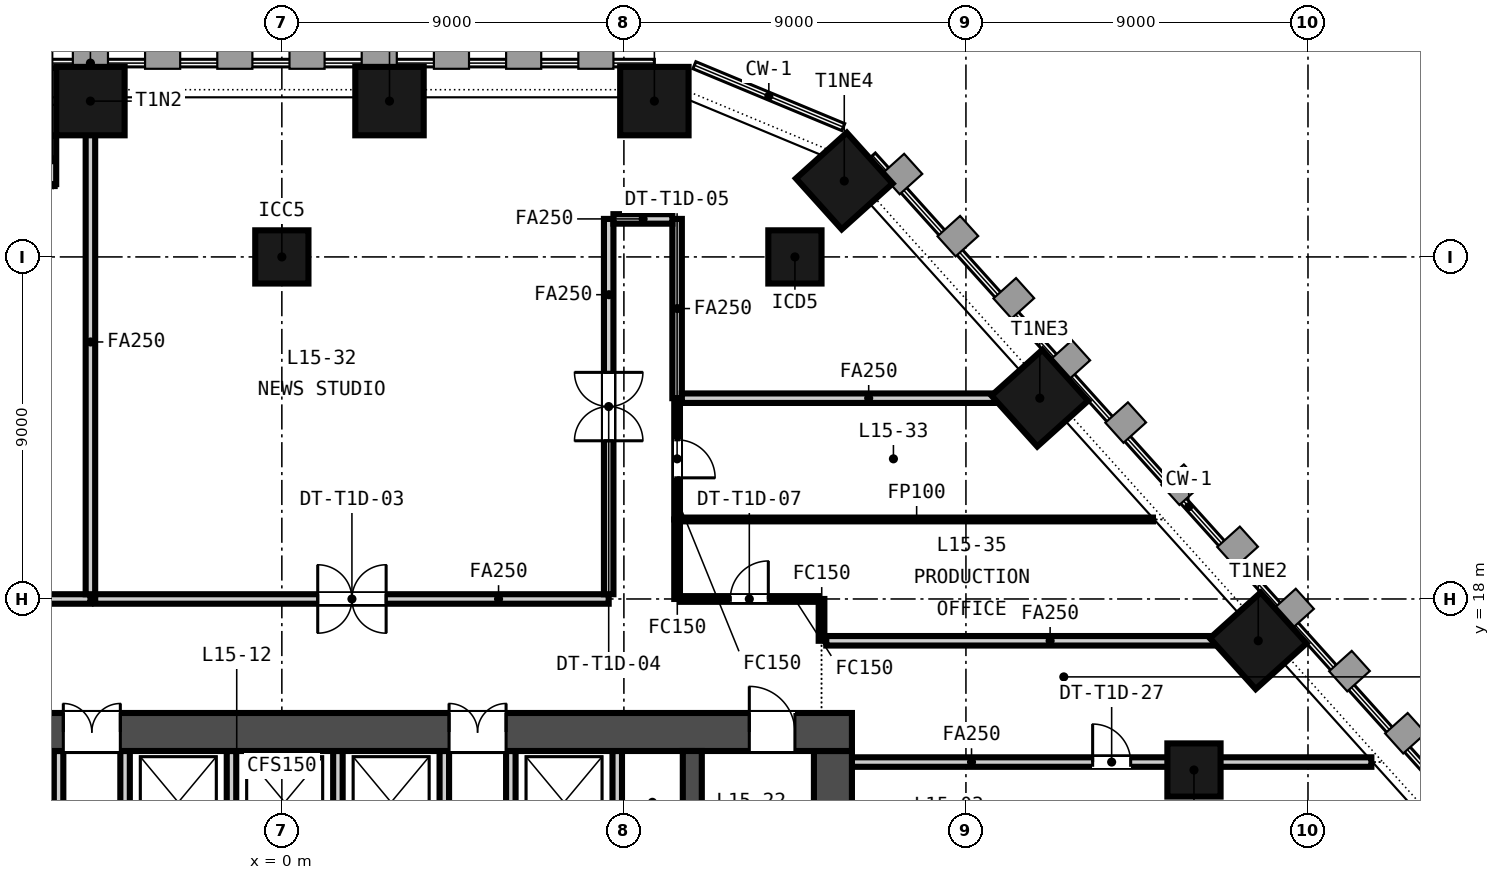
"""IFC4 building model, lengths in metres.
Left out: names, types, materials, properties, quantities, classifications, styles, units other than length and angle.
Written with IfcOpenShell. Run it as: python <this file> out.ifc"""

import sys

from ifc_helpers import new_model, si_unit, direction, frame, frame_2d, origin, origin_2d, place, context, subcontext, project, spatial, rectangle, extrude, element, fill, save


model = new_model("IFC4")
c1 = context("Model", 3, precision=1e-05, world=origin(), true_north=direction((0.0, 1.0)))
c2 = subcontext(c1, "Body", "Model", "MODEL_VIEW")
j1 = project(units=[si_unit("LENGTHUNIT", "METRE"), si_unit("PLANEANGLEUNIT", "RADIAN")], contexts=[c1])
p1 = place(None, origin())
s1 = spatial("IfcSite", under=j1, at=p1, CompositionType="ELEMENT")
p2 = place(p1, origin())
s2 = spatial("IfcBuilding", under=s1, at=p2, CompositionType="ELEMENT")
p3 = place(p2, frame((0.0, 0.0, 68.85)))
s3 = spatial("IfcBuildingStorey", under=s2, at=p3, CompositionType="ELEMENT", Elevation=68.85)
p4 = place(p3, frame((-15.0, 14.5, -0.15), z_axis=(0.0, 0.0, 1.0), x_axis=(1.0, 0.0, 0.0)))
e1 = element("IfcWall", 1, at=p4, inside=s3, PredefinedType="SOLIDWALL", context=c2, shape_type="SweptSolid", body=[
    extrude(rectangle(XDim=30.0, YDim=1.0, at=frame_2d((15.0, 0.0))), origin(), (0.0, 0.0, 1.0), 3.65),
])
p5 = place(p4, frame((9.25, 0.0, 0.15)))
e2 = element("IfcOpeningElement", 2, at=p5, cuts=e1, PredefinedType="OPENING", context=c2, shape_type="SweptSolid", body=[
    extrude(rectangle(XDim=1.5, YDim=2.1, at=frame_2d((0.75, 1.05))), frame((0.0, 0.51, 0.0), z_axis=(0.0, -1.0, 0.0), x_axis=(1.0, 0.0, 0.0)), (0.0, 0.0, 1.0), 1.02),
])
p6 = place(p4, frame((19.4, 0.0, 0.15)))
e3 = element("IfcOpeningElement", 3, at=p6, cuts=e1, PredefinedType="OPENING", context=c2, shape_type="SweptSolid", body=[
    extrude(rectangle(XDim=1.5, YDim=2.1, at=frame_2d((0.75, 1.05))), frame((0.0, 0.51, 0.0), z_axis=(0.0, -1.0, 0.0), x_axis=(1.0, 0.0, 0.0)), (0.0, 0.0, 1.0), 1.02),
])
p7 = place(p4, frame((1.5, 0.0, 0.15)))
e4 = element("IfcOpeningElement", 4, at=p7, cuts=e1, PredefinedType="OPENING", context=c2, shape_type="SweptSolid", body=[
    extrude(rectangle(XDim=1.2, YDim=2.1, at=frame_2d((0.6, 1.05))), frame((0.0, 0.51, 0.0), z_axis=(0.0, -1.0, 0.0), x_axis=(1.0, 0.0, 0.0)), (0.0, 0.0, 1.0), 1.02),
])
p8 = place(p4, frame((27.3, 0.0, 0.15)))
e5 = element("IfcOpeningElement", 5, at=p8, cuts=e1, PredefinedType="OPENING", context=c2, shape_type="SweptSolid", body=[
    extrude(rectangle(XDim=1.2, YDim=2.1, at=frame_2d((0.6, 1.05))), frame((0.0, 0.51, 0.0), z_axis=(0.0, -1.0, 0.0), x_axis=(1.0, 0.0, 0.0)), (0.0, 0.0, 1.0), 1.02),
])
p9 = place(p3, frame((14.5, 1.0, -0.15), z_axis=(0.0, 0.0, 1.0), x_axis=(0.0, 1.0, 0.0)))
e6 = element("IfcWall", 6, at=p9, inside=s3, PredefinedType="SOLIDWALL", context=c2, shape_type="SweptSolid", body=[
    extrude(rectangle(XDim=13.0, YDim=1.0, at=frame_2d((6.5, 0.0))), origin(), (0.0, 0.0, 1.0), 3.65),
])
p10 = place(p3, frame((10.8, 1.0, -0.15), z_axis=(0.0, 0.0, 1.0), x_axis=(0.0, 1.0, 0.0)))
e7 = element("IfcWall", 7, at=p10, inside=s3, PredefinedType="SOLIDWALL", context=c2, shape_type="SweptSolid", body=[
    extrude(rectangle(XDim=13.0, YDim=0.5, at=frame_2d((6.5, 0.0))), origin(), (0.0, 0.0, 1.0), 3.65),
])
for number, where, z_axis, x_axis in (
    (8, (9.802, 31.1, -0.15), (0.0, 0.0, 1.0), (-1.0, 0.0, 0.0)),
    (9, (2.832, 31.1, -0.15), (0.0, 0.0, 1.0), (-1.0, 0.0, 0.0)),
    (10, (-5.037, 31.1, -0.15), (0.0, 0.0, 1.0), (-1.0, 0.0, 0.0)),
    (11, (25.691, 16.9, -0.15), (0.0, 0.0, 1.0), (-0.669, 0.743, 0.0)),
    (12, (19.944, 23.283, -0.15), (0.0, 0.0, 1.0), (-0.669, 0.743, 0.0)),
    (13, (14.799, 28.998, -0.15), (0.0, 0.0, 1.0), (-0.669, 0.743, 0.0)),
):
    element("IfcColumn", number, at=place(p3, frame(where, z_axis=z_axis, x_axis=x_axis)), inside=s3, PredefinedType="COLUMN", context=c2, shape_type="SweptSolid", body=[
        extrude(rectangle(XDim=1.8, YDim=1.8, at=origin_2d()), origin(), (0.0, 0.0, 1.0), 3.65),
    ])
for number, where, z_axis, x_axis in (
    (14, (0.0, 27.0, -0.15), (0.0, 0.0, 1.0), (1.0, 0.0, 0.0)),
    (15, (13.5, 27.0, -0.15), (0.0, 0.0, 1.0), (1.0, 0.0, 0.0)),
    (16, (24.0, 13.5, -0.15), (0.0, 0.0, 1.0), (1.0, 0.0, 0.0)),
):
    element("IfcColumn", number, at=place(p3, frame(where, z_axis=z_axis, x_axis=x_axis)), inside=s3, PredefinedType="COLUMN", context=c2, shape_type="SweptSolid", body=[
        extrude(rectangle(XDim=1.4, YDim=1.4, at=origin_2d()), origin(), (0.0, 0.0, 1.0), 3.65),
    ])
p11 = place(p3, frame((-6.037, 30.2, 0.0), z_axis=(0.0, 0.0, 1.0), x_axis=(0.0, -1.0, 0.0)))
e17 = element("IfcWall", 17, at=p11, inside=s3, PredefinedType="SOLIDWALL", context=c2, shape_type="SweptSolid", body=[
    extrude(rectangle(XDim=1.284, YDim=0.2, at=frame_2d((0.642, 0.0))), origin(), (0.0, 0.0, 1.0), 3.05),
])
for number, where, z_axis, x_axis in (
    (18, (-5.875, 11.3, 0.0), (0.0, 0.0, 1.0), (0.0, 1.0, 0.0)),
    (19, (-4.125, 11.3, 0.0), (0.0, 0.0, 1.0), (0.0, 1.0, 0.0)),
    (20, (-1.325, 11.3, 0.0), (0.0, 0.0, 1.0), (0.0, 1.0, 0.0)),
    (21, (1.475, 11.3, 0.0), (0.0, 0.0, 1.0), (0.0, 1.0, 0.0)),
    (22, (4.275, 11.3, 0.0), (0.0, 0.0, 1.0), (0.0, 1.0, 0.0)),
    (23, (6.025, 11.3, 0.0), (0.0, 0.0, 1.0), (0.0, 1.0, 0.0)),
    (24, (8.825, 11.3, 0.0), (0.0, 0.0, 1.0), (0.0, 1.0, 0.0)),
):
    element("IfcWall", number, at=place(p3, frame(where, z_axis=z_axis, x_axis=x_axis)), inside=s3, PredefinedType="PARTITIONING", context=c2, shape_type="SweptSolid", body=[
        extrude(rectangle(XDim=2.7, YDim=0.25, at=frame_2d((1.35, 0.0))), origin(), (0.0, 0.0, 1.0), 3.5),
    ])
p12 = place(p3, frame((10.4, 28.0, 0.0), z_axis=(0.0, 0.0, 1.0), x_axis=(0.0, -1.0, 0.0)))
e25 = element("IfcWall", 25, at=p12, inside=s3, PredefinedType="PARTITIONING", context=c2, shape_type="SweptSolid", body=[
    extrude(rectangle(XDim=4.717, YDim=0.25, at=frame_2d((2.358, 0.0))), origin(), (0.0, 0.0, 1.0), 2.741),
])
p13 = place(p3, frame((10.4, 23.283, 0.0), z_axis=(0.0, 0.0, 1.0), x_axis=(0.0, -1.0, 0.0)))
e26 = element("IfcWall", 26, at=p13, inside=s3, PredefinedType="PARTITIONING", context=c2, shape_type="SweptSolid", body=[
    extrude(rectangle(XDim=3.191, YDim=0.15, at=frame_2d((1.595, 0.0))), origin(), (0.0, 0.0, 1.0), 2.741),
])
p14 = place(p13, frame((1.095, 0.0, 0.0)))
e27 = element("IfcOpeningElement", 27, at=p14, cuts=e26, PredefinedType="OPENING", context=c2, shape_type="SweptSolid", body=[
    extrude(rectangle(XDim=1.0, YDim=2.1, at=frame_2d((0.5, 1.05))), frame((0.0, 0.085, 0.0), z_axis=(0.0, -1.0, 0.0), x_axis=(1.0, 0.0, 0.0)), (0.0, 0.0, 1.0), 0.17),
])
p15 = place(p3, frame((10.4, 20.092, 0.0), z_axis=(0.0, 0.0, 1.0), x_axis=(0.0, -1.0, 0.0)))
e28 = element("IfcWall", 28, at=p15, inside=s3, PredefinedType="PARTITIONING", context=c2, shape_type="SweptSolid", body=[
    extrude(rectangle(XDim=2.092, YDim=0.15, at=frame_2d((1.046, 0.0))), origin(), (0.0, 0.0, 1.0), 2.741),
])
p16 = place(p3, frame((14.2, 18.0, 0.0), z_axis=(0.0, 0.0, 1.0), x_axis=(0.0, -1.0, 0.0)))
e29 = element("IfcWall", 29, at=p16, inside=s3, PredefinedType="PARTITIONING", context=c2, shape_type="SweptSolid", body=[
    extrude(rectangle(XDim=1.1, YDim=0.15, at=frame_2d((0.55, 0.0))), origin(), (0.0, 0.0, 1.0), 2.741),
])
p17 = place(p3, frame((-12.782, 18.0, 0.0), z_axis=(0.0, 0.0, 1.0), x_axis=(1.0, 0.0, 0.0)))
e30 = element("IfcWall", 30, at=p17, inside=s3, PredefinedType="PARTITIONING", context=c2, shape_type="SweptSolid", body=[
    extrude(rectangle(XDim=7.745, YDim=0.25, at=frame_2d((3.873, 0.0))), origin(), (0.0, 0.0, 1.0), 2.741),
])
p18 = place(p17, frame((2.972, 0.0, 0.0)))
e31 = element("IfcOpeningElement", 31, at=p18, cuts=e30, PredefinedType="OPENING", context=c2, shape_type="SweptSolid", body=[
    extrude(rectangle(XDim=1.8, YDim=2.1, at=frame_2d((0.9, 1.05))), frame((0.0, 0.135, 0.0), z_axis=(0.0, -1.0, 0.0), x_axis=(1.0, 0.0, 0.0)), (0.0, 0.0, 1.0), 0.27),
])
p19 = place(p3, frame((-5.037, 18.125, 0.0), z_axis=(0.0, 0.0, 1.0), x_axis=(0.0, 1.0, 0.0)))
e32 = element("IfcWall", 32, at=p19, inside=s3, PredefinedType="PARTITIONING", context=c2, shape_type="SweptSolid", body=[
    extrude(rectangle(XDim=13.275, YDim=0.25, at=frame_2d((6.637, 0.0))), origin(), (0.0, 0.0, 1.0), 2.741),
])
p20 = place(p3, frame((-4.912, 18.0, 0.0), z_axis=(0.0, 0.0, 1.0), x_axis=(1.0, 0.0, 0.0)))
e33 = element("IfcWall", 33, at=p20, inside=s3, PredefinedType="PARTITIONING", context=c2, shape_type="SweptSolid", body=[
    extrude(rectangle(XDim=13.512, YDim=0.25, at=frame_2d((6.756, 0.0))), origin(), (0.0, 0.0, 1.0), 2.741),
])
p21 = place(p20, frame((5.856, 0.0, 0.0)))
e34 = element("IfcOpeningElement", 34, at=p21, cuts=e33, PredefinedType="OPENING", context=c2, shape_type="SweptSolid", body=[
    extrude(rectangle(XDim=1.8, YDim=2.1, at=frame_2d((0.9, 1.05))), frame((0.0, 0.135, 0.0), z_axis=(0.0, -1.0, 0.0), x_axis=(1.0, 0.0, 0.0)), (0.0, 0.0, 1.0), 0.27),
])
p22 = place(p3, frame((8.6, 18.125, 0.0), z_axis=(0.0, 0.0, 1.0), x_axis=(0.0, 1.0, 0.0)))
e35 = element("IfcWall", 35, at=p22, inside=s3, PredefinedType="PARTITIONING", context=c2, shape_type="SweptSolid", body=[
    extrude(rectangle(XDim=9.875, YDim=0.25, at=frame_2d((4.938, 0.0))), origin(), (0.0, 0.0, 1.0), 2.741),
])
p23 = place(p22, frame((4.038, 0.0, 0.0)))
e36 = element("IfcOpeningElement", 36, at=p23, cuts=e35, PredefinedType="OPENING", context=c2, shape_type="SweptSolid", body=[
    extrude(rectangle(XDim=1.8, YDim=2.1, at=frame_2d((0.9, 1.05))), frame((0.0, 0.135, 0.0), z_axis=(0.0, -1.0, 0.0), x_axis=(1.0, 0.0, 0.0)), (0.0, 0.0, 1.0), 0.27),
])
p24 = place(p3, frame((8.725, 28.0, 0.0), z_axis=(0.0, 0.0, 1.0), x_axis=(1.0, 0.0, 0.0)))
e37 = element("IfcWall", 37, at=p24, inside=s3, PredefinedType="PARTITIONING", context=c2, shape_type="SweptSolid", body=[
    extrude(rectangle(XDim=1.55, YDim=0.25, at=frame_2d((0.775, 0.0))), origin(), (0.0, 0.0, 1.0), 2.741),
])
p25 = place(p3, frame((10.525, 23.283, 0.0), z_axis=(0.0, 0.0, 1.0), x_axis=(1.0, 0.0, 0.0)))
e38 = element("IfcWall", 38, at=p25, inside=s3, PredefinedType="PARTITIONING", context=c2, shape_type="SweptSolid", body=[
    extrude(rectangle(XDim=9.822, YDim=0.25, at=frame_2d((4.911, 0.0))), origin(), (0.0, 0.0, 1.0), 2.741),
])
p26 = place(p3, frame((10.475, 20.092, 0.0), z_axis=(0.0, 0.0, 1.0), x_axis=(1.0, 0.0, 0.0)))
e39 = element("IfcWall", 39, at=p26, inside=s3, PredefinedType="PARTITIONING", context=c2, shape_type="SweptSolid", body=[
    extrude(rectangle(XDim=12.446, YDim=0.1, at=frame_2d((6.223, 0.0))), origin(), (0.0, 0.0, 1.0), 2.741),
])
p27 = place(p3, frame((10.475, 18.0, 0.0), z_axis=(0.0, 0.0, 1.0), x_axis=(1.0, 0.0, 0.0)))
e40 = element("IfcWall", 40, at=p27, inside=s3, PredefinedType="PARTITIONING", context=c2, shape_type="SweptSolid", body=[
    extrude(rectangle(XDim=3.65, YDim=0.15, at=frame_2d((1.825, 0.0))), origin(), (0.0, 0.0, 1.0), 2.741),
])
p28 = place(p27, frame((1.325, 0.0, 0.0)))
e41 = element("IfcOpeningElement", 41, at=p28, cuts=e40, PredefinedType="OPENING", context=c2, shape_type="SweptSolid", body=[
    extrude(rectangle(XDim=1.0, YDim=2.1, at=frame_2d((0.5, 1.05))), frame((0.0, 0.085, 0.0), z_axis=(0.0, -1.0, 0.0), x_axis=(1.0, 0.0, 0.0)), (0.0, 0.0, 1.0), 0.17),
])
p29 = place(p3, frame((14.325, 16.9, 0.0), z_axis=(0.0, 0.0, 1.0), x_axis=(1.0, 0.0, 0.0)))
e42 = element("IfcWall", 42, at=p29, inside=s3, PredefinedType="PARTITIONING", context=c2, shape_type="SweptSolid", body=[
    extrude(rectangle(XDim=11.77, YDim=0.25, at=frame_2d((5.885, 0.0))), origin(), (0.0, 0.0, 1.0), 2.741),
])
p30 = place(p3, frame((15.0, 13.709, 0.0), z_axis=(0.0, 0.0, 1.0), x_axis=(1.0, 0.0, 0.0)))
e43 = element("IfcWall", 43, at=p30, inside=s3, PredefinedType="PARTITIONING", context=c2, shape_type="SweptSolid", body=[
    extrude(rectangle(XDim=13.668, YDim=0.25, at=frame_2d((6.834, 0.0))), origin(), (0.0, 0.0, 1.0), 2.741),
])
p31 = place(p30, frame((6.334, 0.0, 0.0)))
e44 = element("IfcOpeningElement", 44, at=p31, cuts=e43, PredefinedType="OPENING", context=c2, shape_type="SweptSolid", body=[
    extrude(rectangle(XDim=1.0, YDim=2.1, at=frame_2d((0.5, 1.05))), frame((0.0, 0.135, 0.0), z_axis=(0.0, -1.0, 0.0), x_axis=(1.0, 0.0, 0.0)), (0.0, 0.0, 1.0), 0.27),
])
p32 = place(p5, origin())
e45 = element("IfcDoor", 45, at=p32, inside=s3, OperationType="DOUBLE_DOOR_SINGLE_SWING", PredefinedType="DOOR", context=c2, shape_type="SweptSolid", body=[
    extrude(rectangle(XDim=1.5, YDim=2.1, at=frame_2d((0.75, 1.05))), frame((0.0, 0.025, 0.0), z_axis=(0.0, -1.0, 0.0), x_axis=(1.0, 0.0, 0.0)), (0.0, 0.0, 1.0), 0.05),
])
fill(e2, e45)
p33 = place(p6, origin())
e46 = element("IfcDoor", 46, at=p33, inside=s3, OperationType="DOUBLE_DOOR_SINGLE_SWING", PredefinedType="DOOR", context=c2, shape_type="SweptSolid", body=[
    extrude(rectangle(XDim=1.5, YDim=2.1, at=frame_2d((0.75, 1.05))), frame((0.0, 0.025, 0.0), z_axis=(0.0, -1.0, 0.0), x_axis=(1.0, 0.0, 0.0)), (0.0, 0.0, 1.0), 0.05),
])
fill(e3, e46)
p34 = place(p8, origin())
e47 = element("IfcDoor", 47, at=p34, inside=s3, OperationType="SINGLE_SWING_LEFT", PredefinedType="DOOR", context=c2, shape_type="SweptSolid", body=[
    extrude(rectangle(XDim=1.2, YDim=2.1, at=frame_2d((0.6, 1.05))), frame((0.0, 0.025, 0.0), z_axis=(0.0, -1.0, 0.0), x_axis=(1.0, 0.0, 0.0)), (0.0, 0.0, 1.0), 0.05),
])
fill(e5, e47)
p35 = place(p21, origin())
e48 = element("IfcDoor", 48, at=p35, inside=s3, OperationType="DOUBLE_DOOR_DOUBLE_SWING", PredefinedType="DOOR", context=c2, shape_type="SweptSolid", body=[
    extrude(rectangle(XDim=1.8, YDim=2.1, at=frame_2d((0.9, 1.05))), frame((0.0, 0.025, 0.0), z_axis=(0.0, -1.0, 0.0), x_axis=(1.0, 0.0, 0.0)), (0.0, 0.0, 1.0), 0.05),
])
fill(e34, e48)
p36 = place(p23, origin())
e49 = element("IfcDoor", 49, at=p36, inside=s3, OperationType="DOUBLE_DOOR_DOUBLE_SWING", PredefinedType="DOOR", context=c2, shape_type="SweptSolid", body=[
    extrude(rectangle(XDim=1.8, YDim=2.1, at=frame_2d((0.9, 1.05))), frame((0.0, 0.025, 0.0), z_axis=(0.0, -1.0, 0.0), x_axis=(1.0, 0.0, 0.0)), (0.0, 0.0, 1.0), 0.05),
])
fill(e36, e49)
p37 = place(p14, origin())
e50 = element("IfcDoor", 50, at=p37, inside=s3, OperationType="SINGLE_SWING_RIGHT", PredefinedType="DOOR", context=c2, shape_type="SweptSolid", body=[
    extrude(rectangle(XDim=1.0, YDim=2.1, at=frame_2d((0.5, 1.05))), frame((0.0, 0.025, 0.0), z_axis=(0.0, -1.0, 0.0), x_axis=(1.0, 0.0, 0.0)), (0.0, 0.0, 1.0), 0.05),
])
fill(e27, e50)
p38 = place(p28, origin())
e51 = element("IfcDoor", 51, at=p38, inside=s3, OperationType="SINGLE_SWING_RIGHT", PredefinedType="DOOR", context=c2, shape_type="SweptSolid", body=[
    extrude(rectangle(XDim=1.0, YDim=2.1, at=frame_2d((0.5, 1.05))), frame((0.0, 0.025, 0.0), z_axis=(0.0, -1.0, 0.0), x_axis=(1.0, 0.0, 0.0)), (0.0, 0.0, 1.0), 0.05),
])
fill(e41, e51)
p39 = place(p31, origin())
e52 = element("IfcDoor", 52, at=p39, inside=s3, OperationType="SINGLE_SWING_LEFT", PredefinedType="DOOR", context=c2, shape_type="SweptSolid", body=[
    extrude(rectangle(XDim=1.0, YDim=2.1, at=frame_2d((0.5, 1.05))), frame((0.0, 0.025, 0.0), z_axis=(0.0, -1.0, 0.0), x_axis=(1.0, 0.0, 0.0)), (0.0, 0.0, 1.0), 0.05),
])
fill(e44, e52)
save(model, sys.argv[1])
